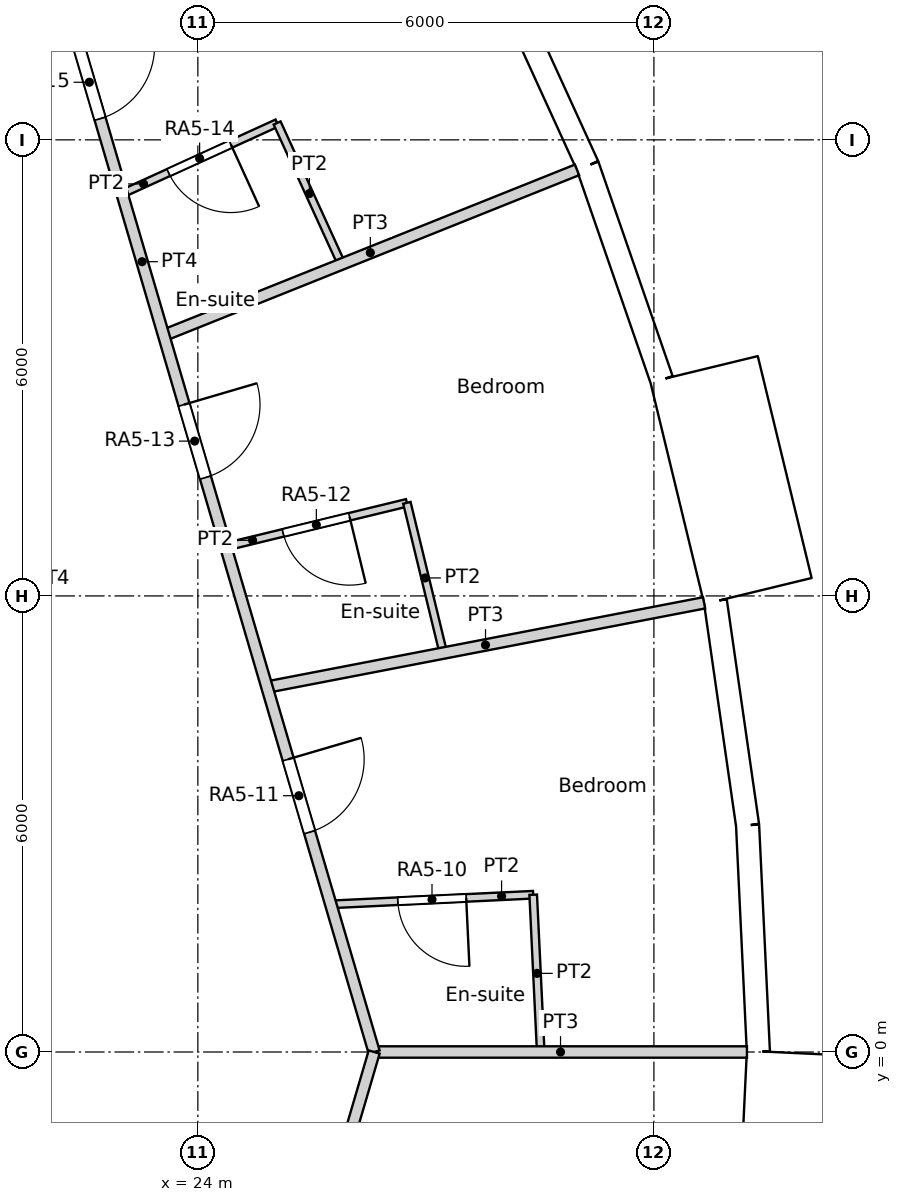
"""IFC4 building model, lengths in metres.
Left out: names, types, materials, properties, quantities, classifications, styles, units other than length and angle.
Written with IfcOpenShell. Run it as: python <this file> out.ifc"""

import sys

from ifc_helpers import new_model, si_unit, direction, frame, frame_2d, origin, origin_2d, place, context, subcontext, project, spatial, rectangle, circle, extrude, element, fill, save


model = new_model("IFC4")
c1 = context("Model", 3, precision=1e-05, world=origin(), true_north=direction((0.0, 1.0)))
c2 = subcontext(c1, "Body", "Model", "MODEL_VIEW")
j1 = project(units=[si_unit("LENGTHUNIT", "METRE"), si_unit("PLANEANGLEUNIT", "RADIAN")], contexts=[c1])
p1 = place(None, origin())
s1 = spatial("IfcSite", under=j1, at=p1, CompositionType="ELEMENT")
p2 = place(p1, origin())
s2 = spatial("IfcBuilding", under=s1, at=p2, CompositionType="ELEMENT")
p3 = place(p2, frame((0.0, 0.0, 71.4)))
s3 = spatial("IfcBuildingStorey", under=s2, at=p3, CompositionType="ELEMENT", Elevation=71.4)
for number, where, z_axis, x_axis in (
    (1, (30.275, 0.0, 0.0), (0.0, 0.0, 1.0), (1.0, 0.0, 0.0)),
    (2, (29.728, 5.729, 0.0), (0.0, 0.0, 1.0), (1.0, 0.0, 0.0)),
    (3, (28.106, 11.252, 0.0), (0.0, 0.0, 1.0), (1.0, 0.0, 0.0)),
):
    element("IfcColumn", number, at=place(p3, frame(where, z_axis=z_axis, x_axis=x_axis)), inside=s3, PredefinedType="COLUMN", context=c2, shape_type="SweptSolid", body=[
        extrude(circle(Radius=0.6, at=origin_2d()), origin(), (0.0, 0.0, 1.0), 3.6),
    ])
for number, where, z_axis, x_axis in (
    (4, (24.548, 0.0, 0.0), (0.0, 0.0, 1.0), (1.0, 0.0, 0.0)),
    (5, (23.886, 5.661, 0.0), (0.0, 0.0, 1.0), (1.0, 0.0, 0.0)),
    (6, (21.937, 11.017, 0.0), (0.0, 0.0, 1.0), (1.0, 0.0, 0.0)),
):
    element("IfcColumn", number, at=place(p3, frame(where, z_axis=z_axis, x_axis=x_axis)), inside=s3, PredefinedType="COLUMN", context=c2, shape_type="SweptSolid", body=[
        extrude(circle(Radius=0.65, at=origin_2d()), origin(), (0.0, 0.0, 1.0), 3.6),
    ])
p4 = place(p3, frame((31.374, 0.006, 0.0), z_axis=(0.0, 0.0, 1.0), x_axis=(-0.047522328113, 0.998870175914, 0.0)))
e7 = element("IfcWall", 7, at=p4, inside=s3, PredefinedType="SOLIDWALL", context=c2, shape_type="SweptSolid", body=[
    extrude(rectangle(XDim=2.98, YDim=0.3, at=frame_2d((1.49, 0.0))), origin(), (0.0, 0.0, 1.0), 3.15),
])
p5 = place(p4, frame((1.49, 0.0, 1.55)))
e8 = element("IfcOpeningElement", 8, at=p5, cuts=e7, PredefinedType="OPENING", context=c2, shape_type="SweptSolid", body=[
    extrude(circle(Radius=0.9, at=origin_2d()), frame((0.0, 0.16, 0.0), z_axis=(0.0, -1.0, 0.0), x_axis=(1.0, 0.0, 0.0)), (0.0, 0.0, 1.0), 0.32),
])
p6 = place(p3, frame((31.232, 2.982, 0.0), z_axis=(0.0, 0.0, 1.0), x_axis=(-0.142327539111, 0.989819615693, 0.0)))
e9 = element("IfcWall", 9, at=p6, inside=s3, PredefinedType="SOLIDWALL", context=c2, shape_type="SweptSolid", body=[
    extrude(rectangle(XDim=2.979, YDim=0.3, at=frame_2d((1.49, 0.0))), origin(), (0.0, 0.0, 1.0), 3.15),
])
p7 = place(p6, frame((1.49, 0.0, 1.55)))
e10 = element("IfcOpeningElement", 10, at=p7, cuts=e9, PredefinedType="OPENING", context=c2, shape_type="SweptSolid", body=[
    extrude(circle(Radius=0.9, at=origin_2d()), frame((0.0, 0.16, 0.0), z_axis=(0.0, -1.0, 0.0), x_axis=(1.0, 0.0, 0.0)), (0.0, 0.0, 1.0), 0.32),
])
p8 = place(p3, frame((31.368, 6.066, -0.45), z_axis=(0.0, 0.0, 1.0), x_axis=(-0.235751415068, 0.971813392732, 0.0)))
e11 = element("IfcWall", 11, at=p8, inside=s3, PredefinedType="ELEMENTEDWALL", context=c2, shape_type="SweptSolid", body=[
    extrude(rectangle(XDim=3.0, YDim=1.45, at=frame_2d((1.5, 0.0))), origin(), (0.0, 0.0, 1.0), 3.6),
])
p9 = place(p8, frame((1.5, 0.0, 2.0)))
e12 = element("IfcOpeningElement", 12, at=p9, cuts=e11, PredefinedType="OPENING", context=c2, shape_type="SweptSolid", body=[
    extrude(circle(Radius=0.9, at=origin_2d()), frame((0.0, 0.735, 0.0), z_axis=(0.0, -1.0, 0.0), x_axis=(1.0, 0.0, 0.0)), (0.0, 0.0, 1.0), 1.47),
])
p10 = place(p3, frame((30.102, 8.845, 0.0), z_axis=(0.0, 0.0, 1.0), x_axis=(-0.327096492592, 0.944990944154, 0.0)))
e13 = element("IfcWall", 13, at=p10, inside=s3, PredefinedType="SOLIDWALL", context=c2, shape_type="SweptSolid", body=[
    extrude(rectangle(XDim=2.979, YDim=0.3, at=frame_2d((1.49, 0.0))), origin(), (0.0, 0.0, 1.0), 3.15),
])
p11 = place(p10, frame((1.49, 0.0, 1.55)))
e14 = element("IfcOpeningElement", 14, at=p11, cuts=e13, PredefinedType="OPENING", context=c2, shape_type="SweptSolid", body=[
    extrude(circle(Radius=0.9, at=origin_2d()), frame((0.0, 0.16, 0.0), z_axis=(0.0, -1.0, 0.0), x_axis=(1.0, 0.0, 0.0)), (0.0, 0.0, 1.0), 0.32),
])
p12 = place(p3, frame((29.127, 11.661, 0.0), z_axis=(0.0, 0.0, 1.0), x_axis=(-0.415407317162, 0.909635509888, 0.0)))
e15 = element("IfcWall", 15, at=p12, inside=s3, PredefinedType="SOLIDWALL", context=c2, shape_type="SweptSolid", body=[
    extrude(rectangle(XDim=2.98, YDim=0.3, at=frame_2d((1.49, 0.0))), origin(), (0.0, 0.0, 1.0), 3.15),
])
p13 = place(p12, frame((1.49, 0.0, 1.55)))
e16 = element("IfcOpeningElement", 16, at=p13, cuts=e15, PredefinedType="OPENING", context=c2, shape_type="SweptSolid", body=[
    extrude(circle(Radius=0.9, at=origin_2d()), frame((0.0, 0.16, 0.0), z_axis=(0.0, -1.0, 0.0), x_axis=(1.0, 0.0, 0.0)), (0.0, 0.0, 1.0), 0.32),
])
p14 = place(p3, frame((31.806, -3.017, -0.45), z_axis=(0.0, 0.0, 1.0), x_axis=(0.047607680889, 0.998866111509, 0.0)))
e17 = element("IfcWall", 17, at=p14, inside=s3, PredefinedType="ELEMENTEDWALL", context=c2, shape_type="SweptSolid", body=[
    extrude(rectangle(XDim=3.0, YDim=1.45, at=frame_2d((1.5, 0.0))), origin(), (0.0, 0.0, 1.0), 3.6),
])
p15 = place(p14, frame((1.5, 0.0, 2.0)))
e18 = element("IfcOpeningElement", 18, at=p15, cuts=e17, PredefinedType="OPENING", context=c2, shape_type="SweptSolid", body=[
    extrude(circle(Radius=0.9, at=origin_2d()), frame((0.0, 0.735, 0.0), z_axis=(0.0, -1.0, 0.0), x_axis=(1.0, 0.0, 0.0)), (0.0, 0.0, 1.0), 1.47),
])
p16 = place(p3, frame((22.14, 14.229, 0.0), z_axis=(0.0, 0.0, 1.0), x_axis=(0.281780364869, -0.959478934617, 0.0)))
e19 = element("IfcWall", 19, at=p16, inside=s3, PredefinedType="PARTITIONING", context=c2, shape_type="SweptSolid", body=[
    extrude(rectangle(XDim=14.83, YDim=0.15, at=frame_2d((7.415, 0.0))), origin(), (0.0, 0.0, 1.0), 3.15),
])
p17 = place(p16, frame((10.816, 0.0, 0.0)))
e20 = element("IfcOpeningElement", 20, at=p17, cuts=e19, PredefinedType="OPENING", context=c2, shape_type="SweptSolid", body=[
    extrude(rectangle(XDim=1.0, YDim=2.1, at=frame_2d((0.5, 1.05))), frame((0.0, 0.075, 0.0), z_axis=(0.0, -1.0, 0.0), x_axis=(1.0, 0.0, 0.0)), (0.0, 0.0, 1.0), 0.15),
])
p18 = place(p16, frame((5.953, 0.0, 0.0)))
e21 = element("IfcOpeningElement", 21, at=p18, cuts=e19, PredefinedType="OPENING", context=c2, shape_type="SweptSolid", body=[
    extrude(rectangle(XDim=1.0, YDim=2.1, at=frame_2d((0.5, 1.05))), frame((0.0, 0.075, 0.0), z_axis=(0.0, -1.0, 0.0), x_axis=(1.0, 0.0, 0.0)), (0.0, 0.0, 1.0), 0.15),
])
p19 = place(p16, frame((1.033, 0.0, 0.0)))
e22 = element("IfcOpeningElement", 22, at=p19, cuts=e19, PredefinedType="OPENING", context=c2, shape_type="SweptSolid", body=[
    extrude(rectangle(XDim=1.0, YDim=2.1, at=frame_2d((0.5, 1.05))), frame((0.0, 0.075, 0.0), z_axis=(0.0, -1.0, 0.0), x_axis=(1.0, 0.0, 0.0)), (0.0, 0.0, 1.0), 0.15),
])
p20 = place(p3, frame((22.141, -14.229, 0.0), z_axis=(0.0, 0.0, 1.0), x_axis=(0.281765208947, 0.959483385488, 0.0)))
e23 = element("IfcWall", 23, at=p20, inside=s3, PredefinedType="PARTITIONING", context=c2, shape_type="SweptSolid", body=[
    extrude(rectangle(XDim=14.83, YDim=0.15, at=frame_2d((7.415, 0.0))), origin(), (0.0, 0.0, 1.0), 3.15),
])
p21 = place(p20, frame((1.033, 0.0, 0.0)))
e24 = element("IfcOpeningElement", 24, at=p21, cuts=e23, PredefinedType="OPENING", context=c2, shape_type="SweptSolid", body=[
    extrude(rectangle(XDim=1.0, YDim=2.1, at=frame_2d((0.5, 1.05))), frame((0.0, 0.075, 0.0), z_axis=(0.0, -1.0, 0.0), x_axis=(1.0, 0.0, 0.0)), (0.0, 0.0, 1.0), 0.15),
])
p22 = place(p20, frame((9.765, 0.0, 0.0)))
e25 = element("IfcOpeningElement", 25, at=p22, cuts=e23, PredefinedType="OPENING", context=c2, shape_type="SweptSolid", body=[
    extrude(rectangle(XDim=1.8, YDim=2.1, at=frame_2d((0.9, 1.05))), frame((0.0, 0.075, 0.0), z_axis=(0.0, -1.0, 0.0), x_axis=(1.0, 0.0, 0.0)), (0.0, 0.0, 1.0), 0.15),
])
p23 = place(p3, frame((28.412, 2.069, 0.0), z_axis=(0.0, 0.0, 1.0), x_axis=(0.047733138673, -0.998860124078, 0.0)))
e26 = element("IfcWall", 26, at=p23, inside=s3, PredefinedType="PARTITIONING", context=c2, shape_type="SweptSolid", body=[
    extrude(rectangle(XDim=2.072, YDim=0.1, at=frame_2d((1.036, 0.0))), origin(), (0.0, 0.0, 1.0), 3.15),
])
p24 = place(p3, frame((25.749, 1.942, 0.0), z_axis=(0.0, 0.0, 1.0), x_axis=(0.998861290624, 0.047708721344, 0.0)))
e27 = element("IfcWall", 27, at=p24, inside=s3, PredefinedType="PARTITIONING", context=c2, shape_type="SweptSolid", body=[
    extrude(rectangle(XDim=2.666, YDim=0.1, at=frame_2d((1.333, 0.0))), origin(), (0.0, 0.0, 1.0), 3.15),
])
p25 = place(p24, frame((0.883, 0.0, 0.0)))
e28 = element("IfcOpeningElement", 28, at=p25, cuts=e27, PredefinedType="OPENING", context=c2, shape_type="SweptSolid", body=[
    extrude(rectangle(XDim=0.9, YDim=2.04, at=frame_2d((0.45, 1.02))), frame((0.0, 0.05, 0.0), z_axis=(0.0, -1.0, 0.0), x_axis=(1.0, 0.0, 0.0)), (0.0, 0.0, 1.0), 0.1),
])
p26 = place(p3, frame((24.909, 4.8, 0.0), z_axis=(0.0, 0.0, 1.0), x_axis=(0.981919819649, 0.18929729998, 0.0)))
e29 = element("IfcWall", 29, at=p26, inside=s3, PredefinedType="PARTITIONING", context=c2, shape_type="SweptSolid", body=[
    extrude(rectangle(XDim=5.857, YDim=0.15, at=frame_2d((2.928, 0.0))), origin(), (0.0, 0.0, 1.0), 3.15),
])
p27 = place(p3, frame((26.319, 0.0, 0.0), z_axis=(0.0, 0.0, 1.0), x_axis=(1.0, 0.0, 0.0)))
e30 = element("IfcWall", 30, at=p27, inside=s3, PredefinedType="PARTITIONING", context=c2, shape_type="SweptSolid", body=[
    extrude(rectangle(XDim=4.905, YDim=0.15, at=frame_2d((2.453, 0.0))), origin(), (0.0, 0.0, 1.0), 3.15),
])
p28 = place(p3, frame((26.75, 7.225, 0.0), z_axis=(0.0, 0.0, 1.0), x_axis=(0.23592286129, -0.97177178572, 0.0)))
e31 = element("IfcWall", 31, at=p28, inside=s3, PredefinedType="PARTITIONING", context=c2, shape_type="SweptSolid", body=[
    extrude(rectangle(XDim=2.034, YDim=0.1, at=frame_2d((1.017, 0.0))), origin(), (0.0, 0.0, 1.0), 3.15),
])
p29 = place(p3, frame((24.367, 6.646, 0.0), z_axis=(0.0, 0.0, 1.0), x_axis=(0.971720101056, 0.236135650006, 0.0)))
e32 = element("IfcWall", 32, at=p29, inside=s3, PredefinedType="PARTITIONING", context=c2, shape_type="SweptSolid", body=[
    extrude(rectangle(XDim=2.452, YDim=0.1, at=frame_2d((1.226, 0.0))), origin(), (0.0, 0.0, 1.0), 3.15),
])
p30 = place(p29, frame((0.776, 0.0, 0.0)))
e33 = element("IfcOpeningElement", 33, at=p30, cuts=e32, PredefinedType="OPENING", context=c2, shape_type="SweptSolid", body=[
    extrude(rectangle(XDim=0.9, YDim=2.04, at=frame_2d((0.45, 1.02))), frame((0.0, 0.05, 0.0), z_axis=(0.0, -1.0, 0.0), x_axis=(1.0, 0.0, 0.0)), (0.0, 0.0, 1.0), 0.1),
])
p31 = place(p3, frame((23.55, 9.427, 0.0), z_axis=(0.0, 0.0, 1.0), x_axis=(0.928307005382, 0.371814609393, 0.0)))
e34 = element("IfcWall", 34, at=p31, inside=s3, PredefinedType="PARTITIONING", context=c2, shape_type="SweptSolid", body=[
    extrude(rectangle(XDim=5.858, YDim=0.15, at=frame_2d((2.929, 0.0))), origin(), (0.0, 0.0, 1.0), 3.15),
])
p32 = place(p3, frame((25.043, 12.222, 0.0), z_axis=(0.0, 0.0, 1.0), x_axis=(0.41546015385, -0.909611378866, 0.0)))
e35 = element("IfcWall", 35, at=p32, inside=s3, PredefinedType="PARTITIONING", context=c2, shape_type="SweptSolid", body=[
    extrude(rectangle(XDim=2.042, YDim=0.1, at=frame_2d((1.021, 0.0))), origin(), (0.0, 0.0, 1.0), 3.15),
])
p33 = place(p3, frame((23.003, 11.291, 0.0), z_axis=(0.0, 0.0, 1.0), x_axis=(0.90975773562, 0.41513956988, 0.0)))
e36 = element("IfcWall", 36, at=p33, inside=s3, PredefinedType="PARTITIONING", context=c2, shape_type="SweptSolid", body=[
    extrude(rectangle(XDim=2.242, YDim=0.1, at=frame_2d((1.121, 0.0))), origin(), (0.0, 0.0, 1.0), 3.15),
])
p34 = place(p33, frame((0.671, 0.0, 0.0)))
e37 = element("IfcOpeningElement", 37, at=p34, cuts=e36, PredefinedType="OPENING", context=c2, shape_type="SweptSolid", body=[
    extrude(rectangle(XDim=0.9, YDim=2.04, at=frame_2d((0.45, 1.02))), frame((0.0, 0.05, 0.0), z_axis=(0.0, -1.0, 0.0), x_axis=(1.0, 0.0, 0.0)), (0.0, 0.0, 1.0), 0.1),
])
p35 = place(p5, origin())
e38 = element("IfcWindow", 38, at=p35, inside=s3, PartitioningType="SINGLE_PANEL", PredefinedType="WINDOW", context=c2, shape_type="SweptSolid", body=[
    extrude(circle(Radius=0.9, at=origin_2d()), frame((0.0, 0.12, 0.0), z_axis=(0.0, -1.0, 0.0), x_axis=(1.0, 0.0, 0.0)), (0.0, 0.0, 1.0), 0.1),
])
fill(e8, e38)
p36 = place(p7, origin())
e39 = element("IfcWindow", 39, at=p36, inside=s3, PartitioningType="SINGLE_PANEL", PredefinedType="WINDOW", context=c2, shape_type="SweptSolid", body=[
    extrude(circle(Radius=0.9, at=origin_2d()), frame((0.0, 0.12, 0.0), z_axis=(0.0, -1.0, 0.0), x_axis=(1.0, 0.0, 0.0)), (0.0, 0.0, 1.0), 0.1),
])
fill(e10, e39)
p37 = place(p9, origin())
e40 = element("IfcWindow", 40, at=p37, inside=s3, PartitioningType="SINGLE_PANEL", PredefinedType="WINDOW", context=c2, shape_type="SweptSolid", body=[
    extrude(circle(Radius=0.9, at=origin_2d()), frame((0.0, 0.695, 0.0), z_axis=(0.0, -1.0, 0.0), x_axis=(1.0, 0.0, 0.0)), (0.0, 0.0, 1.0), 0.1),
])
fill(e12, e40)
p38 = place(p11, origin())
e41 = element("IfcWindow", 41, at=p38, inside=s3, PartitioningType="SINGLE_PANEL", PredefinedType="WINDOW", context=c2, shape_type="SweptSolid", body=[
    extrude(circle(Radius=0.9, at=origin_2d()), frame((0.0, 0.12, 0.0), z_axis=(0.0, -1.0, 0.0), x_axis=(1.0, 0.0, 0.0)), (0.0, 0.0, 1.0), 0.1),
])
fill(e14, e41)
p39 = place(p13, origin())
e42 = element("IfcWindow", 42, at=p39, inside=s3, PartitioningType="SINGLE_PANEL", PredefinedType="WINDOW", context=c2, shape_type="SweptSolid", body=[
    extrude(circle(Radius=0.9, at=origin_2d()), frame((0.0, 0.12, 0.0), z_axis=(0.0, -1.0, 0.0), x_axis=(1.0, 0.0, 0.0)), (0.0, 0.0, 1.0), 0.1),
])
fill(e16, e42)
p40 = place(p15, origin())
e43 = element("IfcWindow", 43, at=p40, inside=s3, PartitioningType="SINGLE_PANEL", PredefinedType="WINDOW", context=c2, shape_type="SweptSolid", body=[
    extrude(circle(Radius=0.9, at=origin_2d()), frame((0.0, 0.695, 0.0), z_axis=(0.0, -1.0, 0.0), x_axis=(1.0, 0.0, 0.0)), (0.0, 0.0, 1.0), 0.1),
])
fill(e18, e43)
p41 = place(p25, origin())
e44 = element("IfcDoor", 44, at=p41, inside=s3, OperationType="SINGLE_SWING_LEFT", PredefinedType="DOOR", context=c2, shape_type="SweptSolid", body=[
    extrude(rectangle(XDim=0.9, YDim=2.04, at=frame_2d((0.45, 1.02))), frame((0.0, 0.025, 0.0), z_axis=(0.0, -1.0, 0.0), x_axis=(1.0, 0.0, 0.0)), (0.0, 0.0, 1.0), 0.05),
])
fill(e28, e44)
p42 = place(p17, origin())
e45 = element("IfcDoor", 45, at=p42, inside=s3, OperationType="SINGLE_SWING_LEFT", PredefinedType="DOOR", context=c2, shape_type="SweptSolid", body=[
    extrude(rectangle(XDim=1.0, YDim=2.1, at=frame_2d((0.5, 1.05))), frame((0.0, 0.025, 0.0), z_axis=(0.0, -1.0, 0.0), x_axis=(1.0, 0.0, 0.0)), (0.0, 0.0, 1.0), 0.05),
])
fill(e20, e45)
p43 = place(p30, origin())
e46 = element("IfcDoor", 46, at=p43, inside=s3, OperationType="SINGLE_SWING_LEFT", PredefinedType="DOOR", context=c2, shape_type="SweptSolid", body=[
    extrude(rectangle(XDim=0.9, YDim=2.04, at=frame_2d((0.45, 1.02))), frame((0.0, 0.025, 0.0), z_axis=(0.0, -1.0, 0.0), x_axis=(1.0, 0.0, 0.0)), (0.0, 0.0, 1.0), 0.05),
])
fill(e33, e46)
p44 = place(p18, origin())
e47 = element("IfcDoor", 47, at=p44, inside=s3, OperationType="SINGLE_SWING_LEFT", PredefinedType="DOOR", context=c2, shape_type="SweptSolid", body=[
    extrude(rectangle(XDim=1.0, YDim=2.1, at=frame_2d((0.5, 1.05))), frame((0.0, 0.025, 0.0), z_axis=(0.0, -1.0, 0.0), x_axis=(1.0, 0.0, 0.0)), (0.0, 0.0, 1.0), 0.05),
])
fill(e21, e47)
p45 = place(p34, origin())
e48 = element("IfcDoor", 48, at=p45, inside=s3, OperationType="SINGLE_SWING_LEFT", PredefinedType="DOOR", context=c2, shape_type="SweptSolid", body=[
    extrude(rectangle(XDim=0.9, YDim=2.04, at=frame_2d((0.45, 1.02))), frame((0.0, 0.025, 0.0), z_axis=(0.0, -1.0, 0.0), x_axis=(1.0, 0.0, 0.0)), (0.0, 0.0, 1.0), 0.05),
])
fill(e37, e48)
p46 = place(p19, origin())
e49 = element("IfcDoor", 49, at=p46, inside=s3, OperationType="SINGLE_SWING_LEFT", PredefinedType="DOOR", context=c2, shape_type="SweptSolid", body=[
    extrude(rectangle(XDim=1.0, YDim=2.1, at=frame_2d((0.5, 1.05))), frame((0.0, 0.025, 0.0), z_axis=(0.0, -1.0, 0.0), x_axis=(1.0, 0.0, 0.0)), (0.0, 0.0, 1.0), 0.05),
])
fill(e22, e49)
save(model, sys.argv[1])
